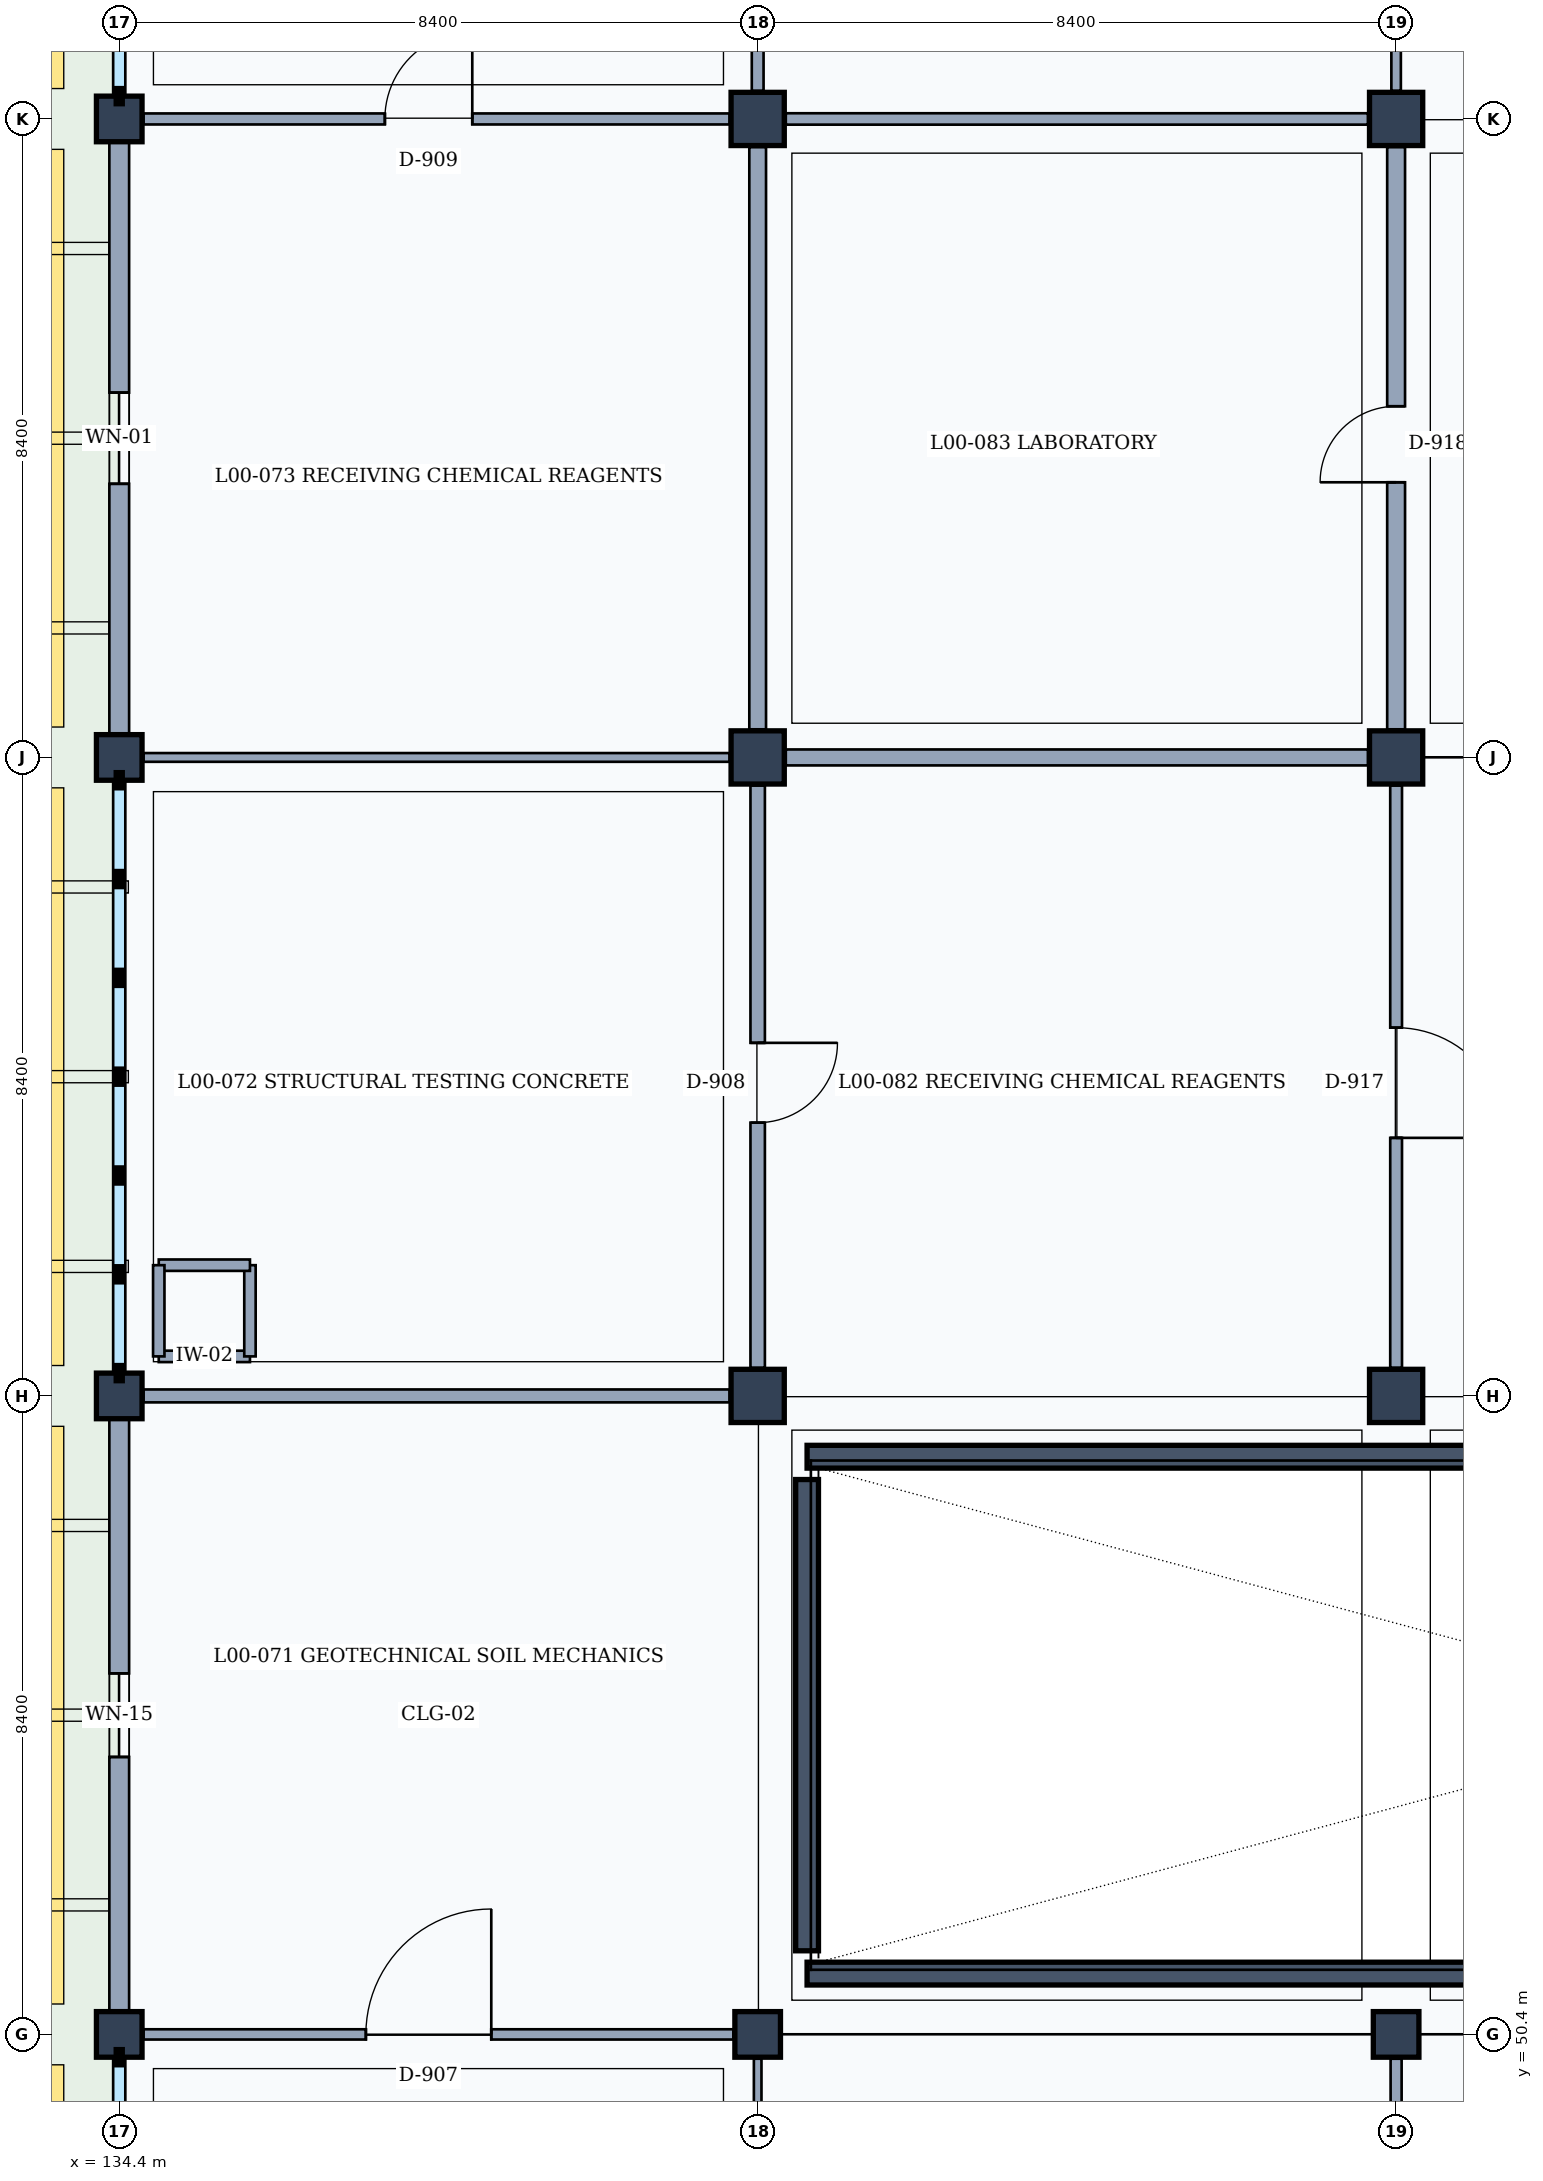
"""IFC4 building model, lengths in metres.
Left out: names, types, materials, properties, quantities, classifications, styles, units other than length and angle.
Written with IfcOpenShell. Run it as: python <this file> out.ifc"""

import sys

from ifc_helpers import new_model, si_unit, direction, frame, frame_2d, origin, origin_2d, place, context, subcontext, project, spatial, rectangle, extrude, element, fill, save


model = new_model("IFC4")
c1 = context("Model", 3, precision=1e-05, world=origin(), true_north=direction((0.0, 1.0)))
c2 = subcontext(c1, "Body", "Model", "MODEL_VIEW")
j1 = project(units=[si_unit("LENGTHUNIT", "METRE"), si_unit("PLANEANGLEUNIT", "RADIAN")], contexts=[c1])
p1 = place(None, origin())
s1 = spatial("IfcSite", under=j1, at=p1, CompositionType="ELEMENT")
p2 = place(p1, origin())
s2 = spatial("IfcBuilding", under=s1, at=p2, CompositionType="ELEMENT")
p3 = place(p2, origin())
s3 = spatial("IfcBuildingStorey", under=s2, at=p3, CompositionType="ELEMENT", Elevation=0.0)
for number, where, z_axis, x_axis in (
    (1, (134.4, 50.4, 0.0), (0.0, 0.0, 1.0), (1.0, 0.0, 0.0)),
    (2, (134.4, 58.8, 0.0), (0.0, 0.0, 1.0), (1.0, 0.0, 0.0)),
    (3, (134.4, 67.2, 0.0), (0.0, 0.0, 1.0), (1.0, 0.0, 0.0)),
    (4, (134.4, 75.6, 0.0), (0.0, 0.0, 1.0), (1.0, 0.0, 0.0)),
    (5, (142.8, 50.4, 0.0), (0.0, 0.0, 1.0), (1.0, 0.0, 0.0)),
):
    element("IfcColumn", number, at=place(p3, frame(where, z_axis=z_axis, x_axis=x_axis)), inside=s3, PredefinedType="COLUMN", context=c2, shape_type="SweptSolid", body=[
        extrude(rectangle(XDim=0.6, YDim=0.6, at=origin_2d()), origin(), (0.0, 0.0, 1.0), 4.8),
    ])
for number, where, z_axis, x_axis in (
    (6, (142.8, 58.8, 0.0), (0.0, 0.0, 1.0), (1.0, 0.0, 0.0)),
    (7, (142.8, 67.2, 0.0), (0.0, 0.0, 1.0), (1.0, 0.0, 0.0)),
    (8, (142.8, 75.6, 0.0), (0.0, 0.0, 1.0), (1.0, 0.0, 0.0)),
):
    element("IfcColumn", number, at=place(p3, frame(where, z_axis=z_axis, x_axis=x_axis)), inside=s3, PredefinedType="COLUMN", context=c2, shape_type="SweptSolid", body=[
        extrude(rectangle(XDim=0.7, YDim=0.7, at=origin_2d()), origin(), (0.0, 0.0, 1.0), 4.8),
    ])
p4 = place(p3, frame((151.2, 50.4, 0.0), z_axis=(0.0, 0.0, 1.0), x_axis=(1.0, 0.0, 0.0)))
e9 = element("IfcColumn", 9, at=p4, inside=s3, PredefinedType="COLUMN", context=c2, shape_type="SweptSolid", body=[
    extrude(rectangle(XDim=0.6, YDim=0.6, at=origin_2d()), origin(), (0.0, 0.0, 1.0), 4.8),
])
for number, where, z_axis, x_axis in (
    (10, (151.2, 58.8, 0.0), (0.0, 0.0, 1.0), (1.0, 0.0, 0.0)),
    (11, (151.2, 67.2, 0.0), (0.0, 0.0, 1.0), (1.0, 0.0, 0.0)),
    (12, (151.2, 75.6, 0.0), (0.0, 0.0, 1.0), (1.0, 0.0, 0.0)),
):
    element("IfcColumn", number, at=place(p3, frame(where, z_axis=z_axis, x_axis=x_axis)), inside=s3, PredefinedType="COLUMN", context=c2, shape_type="SweptSolid", body=[
        extrude(rectangle(XDim=0.7, YDim=0.7, at=origin_2d()), origin(), (0.0, 0.0, 1.0), 4.8),
    ])
p5 = place(p3, frame((134.4, 50.7, 0.0), z_axis=(0.0, 0.0, 1.0), x_axis=(0.0, 1.0, 0.0)))
e13 = element("IfcWall", 13, at=p5, inside=s3, PredefinedType="SOLIDWALL", context=c2, shape_type="SweptSolid", body=[
    extrude(rectangle(XDim=7.8, YDim=0.26, at=frame_2d((3.9, 0.0))), origin(), (0.0, 0.0, 1.0), 3.96),
])
p6 = place(p5, frame((3.35, 0.0, 0.95)))
e14 = element("IfcOpeningElement", 14, at=p6, cuts=e13, PredefinedType="OPENING", context=c2, shape_type="SweptSolid", body=[
    extrude(rectangle(XDim=1.1, YDim=1.95, at=frame_2d((0.55, 0.975))), frame((0.0, 0.14, 0.0), z_axis=(0.0, -1.0, 0.0), x_axis=(1.0, 0.0, 0.0)), (0.0, 0.0, 1.0), 0.28),
])
p7 = place(p3, frame((134.4, 67.5, 0.0), z_axis=(0.0, 0.0, 1.0), x_axis=(0.0, 1.0, 0.0)))
e15 = element("IfcWall", 15, at=p7, inside=s3, PredefinedType="SOLIDWALL", context=c2, shape_type="SweptSolid", body=[
    extrude(rectangle(XDim=7.8, YDim=0.26, at=frame_2d((3.9, 0.0))), origin(), (0.0, 0.0, 1.0), 3.96),
])
p8 = place(p7, frame((3.3, 0.0, 0.95)))
e16 = element("IfcOpeningElement", 16, at=p8, cuts=e15, PredefinedType="OPENING", context=c2, shape_type="SweptSolid", body=[
    extrude(rectangle(XDim=1.2, YDim=1.8, at=frame_2d((0.6, 0.9))), frame((0.0, 0.14, 0.0), z_axis=(0.0, -1.0, 0.0), x_axis=(1.0, 0.0, 0.0)), (0.0, 0.0, 1.0), 0.28),
])
for number, where, z_axis, x_axis in (
    (17, (143.45, 51.2, 0.0), (0.0, 0.0, 1.0), (1.0, 0.0, 0.0)),
    (18, (167.85, 58.0, 0.0), (0.0, 0.0, 1.0), (-1.0, 0.0, 0.0)),
):
    element("IfcWall", number, at=place(p3, frame(where, z_axis=z_axis, x_axis=x_axis)), inside=s3, PredefinedType="SHEAR", context=c2, shape_type="SweptSolid", body=[
        extrude(rectangle(XDim=24.4, YDim=0.3, at=frame_2d((12.2, 0.0))), origin(), (0.0, 0.0, 1.0), 3.8),
    ])
p9 = place(p3, frame((143.45, 57.7, 0.0), z_axis=(0.0, 0.0, 1.0), x_axis=(0.0, -1.0, 0.0)))
e19 = element("IfcWall", 19, at=p9, inside=s3, PredefinedType="SHEAR", context=c2, shape_type="SweptSolid", body=[
    extrude(rectangle(XDim=6.2, YDim=0.3, at=frame_2d((3.1, 0.0))), origin(), (0.0, 0.0, 1.0), 3.8),
])
p10 = place(p3, frame((134.92, 59.32, 0.0), z_axis=(0.0, 0.0, 1.0), x_axis=(1.0, 0.0, 0.0)))
e20 = element("IfcWall", 20, at=p10, inside=s3, PredefinedType="PARTITIONING", context=c2, shape_type="SweptSolid", body=[
    extrude(rectangle(XDim=1.2, YDim=0.15, at=frame_2d((0.6, 0.0))), origin(), (0.0, 0.0, 1.0), 4.55),
])
p11 = place(p3, frame((136.12, 59.32, 0.0), z_axis=(0.0, 0.0, 1.0), x_axis=(0.0, 1.0, 0.0)))
e21 = element("IfcWall", 21, at=p11, inside=s3, PredefinedType="PARTITIONING", context=c2, shape_type="SweptSolid", body=[
    extrude(rectangle(XDim=1.2, YDim=0.15, at=frame_2d((0.6, 0.0))), origin(), (0.0, 0.0, 1.0), 4.55),
])
p12 = place(p3, frame((136.12, 60.52, 0.0), z_axis=(0.0, 0.0, 1.0), x_axis=(-1.0, 0.0, 0.0)))
e22 = element("IfcWall", 22, at=p12, inside=s3, PredefinedType="PARTITIONING", context=c2, shape_type="SweptSolid", body=[
    extrude(rectangle(XDim=1.2, YDim=0.15, at=frame_2d((0.6, 0.0))), origin(), (0.0, 0.0, 1.0), 4.55),
])
p13 = place(p3, frame((134.92, 60.52, 0.0), z_axis=(0.0, 0.0, 1.0), x_axis=(0.0, -1.0, 0.0)))
e23 = element("IfcWall", 23, at=p13, inside=s3, PredefinedType="PARTITIONING", context=c2, shape_type="SweptSolid", body=[
    extrude(rectangle(XDim=1.2, YDim=0.15, at=frame_2d((0.6, 0.0))), origin(), (0.0, 0.0, 1.0), 4.55),
])
p14 = place(p3, frame((142.8, 42.32, 0.0), z_axis=(0.0, 0.0, 1.0), x_axis=(0.0, 1.0, 0.0)))
e24 = element("IfcWall", 24, at=p14, inside=s3, PredefinedType="MOVABLE", context=c2, shape_type="SweptSolid", body=[
    extrude(rectangle(XDim=7.76, YDim=0.1, at=frame_2d((3.88, 0.0))), origin(), (0.0, 0.0, 1.0), 3.92),
])
p15 = place(p3, frame((134.72, 50.4, 0.0), z_axis=(0.0, 0.0, 1.0), x_axis=(1.0, 0.0, 0.0)))
e25 = element("IfcWall", 25, at=p15, inside=s3, PredefinedType="PARTITIONING", context=c2, shape_type="SweptSolid", body=[
    extrude(rectangle(XDim=7.76, YDim=0.135, at=frame_2d((3.88, 0.0))), origin(), (0.0, 0.0, 1.0), 3.85),
])
p16 = place(p15, frame((2.925, 0.0, 0.0)))
e26 = element("IfcOpeningElement", 26, at=p16, cuts=e25, PredefinedType="OPENING", context=c2, shape_type="SweptSolid", body=[
    extrude(rectangle(XDim=1.65, YDim=2.25, at=frame_2d((0.825, 1.125))), frame((0.0, 0.077, 0.0), z_axis=(0.0, -1.0, 0.0), x_axis=(1.0, 0.0, 0.0)), (0.0, 0.0, 1.0), 0.155),
])
p17 = place(p3, frame((134.72, 58.8, 0.0), z_axis=(0.0, 0.0, 1.0), x_axis=(1.0, 0.0, 0.0)))
e27 = element("IfcWall", 27, at=p17, inside=s3, PredefinedType="PARTITIONING", context=c2, shape_type="SweptSolid", body=[
    extrude(rectangle(XDim=7.71, YDim=0.17, at=frame_2d((3.855, 0.0))), origin(), (0.0, 0.0, 1.0), 3.85),
])
p18 = place(p3, frame((142.8, 59.17, 0.0), z_axis=(0.0, 0.0, 1.0), x_axis=(0.0, 1.0, 0.0)))
e28 = element("IfcWall", 28, at=p18, inside=s3, PredefinedType="PARTITIONING", context=c2, shape_type="SweptSolid", body=[
    extrude(rectangle(XDim=7.66, YDim=0.19, at=frame_2d((3.83, 0.0))), origin(), (0.0, 0.0, 1.0), 3.92),
])
p19 = place(p18, frame((3.225, 0.0, 0.0)))
e29 = element("IfcOpeningElement", 29, at=p19, cuts=e28, PredefinedType="OPENING", context=c2, shape_type="SweptSolid", body=[
    extrude(rectangle(XDim=1.05, YDim=2.2, at=frame_2d((0.525, 1.1))), frame((0.0, 0.105, 0.0), z_axis=(0.0, -1.0, 0.0), x_axis=(1.0, 0.0, 0.0)), (0.0, 0.0, 1.0), 0.21),
])
p20 = place(p3, frame((134.72, 67.2, 0.0), z_axis=(0.0, 0.0, 1.0), x_axis=(1.0, 0.0, 0.0)))
e30 = element("IfcWall", 30, at=p20, inside=s3, PredefinedType="PARTITIONING", context=c2, shape_type="SweptSolid", body=[
    extrude(rectangle(XDim=7.71, YDim=0.115, at=frame_2d((3.855, 0.0))), origin(), (0.0, 0.0, 1.0), 3.87),
])
p21 = place(p3, frame((142.8, 67.57, 0.0), z_axis=(0.0, 0.0, 1.0), x_axis=(0.0, 1.0, 0.0)))
e31 = element("IfcWall", 31, at=p21, inside=s3, PredefinedType="PARTITIONING", context=c2, shape_type="SweptSolid", body=[
    extrude(rectangle(XDim=7.66, YDim=0.22, at=frame_2d((3.83, 0.0))), origin(), (0.0, 0.0, 1.0), 3.92),
])
p22 = place(p3, frame((134.72, 75.6, 0.0), z_axis=(0.0, 0.0, 1.0), x_axis=(1.0, 0.0, 0.0)))
e32 = element("IfcWall", 32, at=p22, inside=s3, PredefinedType="PARTITIONING", context=c2, shape_type="SweptSolid", body=[
    extrude(rectangle(XDim=7.71, YDim=0.145, at=frame_2d((3.855, 0.0))), origin(), (0.0, 0.0, 1.0), 3.87),
])
p23 = place(p22, frame((3.175, 0.0, 0.0)))
e33 = element("IfcOpeningElement", 33, at=p23, cuts=e32, PredefinedType="OPENING", context=c2, shape_type="SweptSolid", body=[
    extrude(rectangle(XDim=1.15, YDim=2.25, at=frame_2d((0.575, 1.125))), frame((0.0, 0.083, 0.0), z_axis=(0.0, -1.0, 0.0), x_axis=(1.0, 0.0, 0.0)), (0.0, 0.0, 1.0), 0.165),
])
p24 = place(p3, frame((142.8, 75.97, 0.0), z_axis=(0.0, 0.0, 1.0), x_axis=(0.0, 1.0, 0.0)))
e34 = element("IfcWall", 34, at=p24, inside=s3, PredefinedType="PARTITIONING", context=c2, shape_type="SweptSolid", body=[
    extrude(rectangle(XDim=7.66, YDim=0.155, at=frame_2d((3.83, 0.0))), origin(), (0.0, 0.0, 1.0), 3.92),
])
p25 = place(p3, frame((151.2, 42.32, 0.0), z_axis=(0.0, 0.0, 1.0), x_axis=(0.0, 1.0, 0.0)))
e35 = element("IfcWall", 35, at=p25, inside=s3, PredefinedType="PARTITIONING", context=c2, shape_type="SweptSolid", body=[
    extrude(rectangle(XDim=7.76, YDim=0.145, at=frame_2d((3.88, 0.0))), origin(), (0.0, 0.0, 1.0), 3.92),
])
p26 = place(p25, frame((3.075, 0.0, 0.0)))
e36 = element("IfcOpeningElement", 36, at=p26, cuts=e35, PredefinedType="OPENING", context=c2, shape_type="SweptSolid", body=[
    extrude(rectangle(XDim=1.35, YDim=2.25, at=frame_2d((0.675, 1.125))), frame((0.0, 0.083, 0.0), z_axis=(0.0, -1.0, 0.0), x_axis=(1.0, 0.0, 0.0)), (0.0, 0.0, 1.0), 0.165),
])
p27 = place(p3, frame((151.2, 59.17, 0.0), z_axis=(0.0, 0.0, 1.0), x_axis=(0.0, 1.0, 0.0)))
e37 = element("IfcWall", 37, at=p27, inside=s3, PredefinedType="PARTITIONING", context=c2, shape_type="SweptSolid", body=[
    extrude(rectangle(XDim=7.66, YDim=0.155, at=frame_2d((3.83, 0.0))), origin(), (0.0, 0.0, 1.0), 3.92),
])
p28 = place(p27, frame((3.025, 0.0, 0.0)))
e38 = element("IfcOpeningElement", 38, at=p28, cuts=e37, PredefinedType="OPENING", context=c2, shape_type="SweptSolid", body=[
    extrude(rectangle(XDim=1.45, YDim=2.35, at=frame_2d((0.725, 1.175))), frame((0.0, 0.087, 0.0), z_axis=(0.0, -1.0, 0.0), x_axis=(1.0, 0.0, 0.0)), (0.0, 0.0, 1.0), 0.175),
])
p29 = place(p3, frame((143.17, 67.2, 0.0), z_axis=(0.0, 0.0, 1.0), x_axis=(1.0, 0.0, 0.0)))
e39 = element("IfcWall", 39, at=p29, inside=s3, PredefinedType="PARTITIONING", context=c2, shape_type="SweptSolid", body=[
    extrude(rectangle(XDim=7.66, YDim=0.21, at=frame_2d((3.83, 0.0))), origin(), (0.0, 0.0, 1.0), 3.87),
])
p30 = place(p3, frame((151.2, 67.57, 0.0), z_axis=(0.0, 0.0, 1.0), x_axis=(0.0, 1.0, 0.0)))
e40 = element("IfcWall", 40, at=p30, inside=s3, PredefinedType="PARTITIONING", context=c2, shape_type="SweptSolid", body=[
    extrude(rectangle(XDim=7.66, YDim=0.235, at=frame_2d((3.83, 0.0))), origin(), (0.0, 0.0, 1.0), 3.92),
])
p31 = place(p30, frame((3.25, 0.0, 0.0)))
e41 = element("IfcOpeningElement", 41, at=p31, cuts=e40, PredefinedType="OPENING", context=c2, shape_type="SweptSolid", body=[
    extrude(rectangle(XDim=1.0, YDim=2.15, at=frame_2d((0.5, 1.075))), frame((0.0, 0.127, 0.0), z_axis=(0.0, -1.0, 0.0), x_axis=(1.0, 0.0, 0.0)), (0.0, 0.0, 1.0), 0.255),
])
p32 = place(p3, frame((143.17, 75.6, 0.0), z_axis=(0.0, 0.0, 1.0), x_axis=(1.0, 0.0, 0.0)))
e42 = element("IfcWall", 42, at=p32, inside=s3, PredefinedType="PARTITIONING", context=c2, shape_type="SweptSolid", body=[
    extrude(rectangle(XDim=7.66, YDim=0.15, at=frame_2d((3.83, 0.0))), origin(), (0.0, 0.0, 1.0), 3.87),
])
p33 = place(p3, frame((151.2, 75.97, 0.0), z_axis=(0.0, 0.0, 1.0), x_axis=(0.0, 1.0, 0.0)))
e43 = element("IfcWall", 43, at=p33, inside=s3, PredefinedType="PARTITIONING", context=c2, shape_type="SweptSolid", body=[
    extrude(rectangle(XDim=7.66, YDim=0.125, at=frame_2d((3.83, 0.0))), origin(), (0.0, 0.0, 1.0), 3.92),
])
p34 = place(p6, origin())
e44 = element("IfcWindow", 44, at=p34, inside=s3, PartitioningType="SINGLE_PANEL", PredefinedType="WINDOW", context=c2, shape_type="SweptSolid", body=[
    extrude(rectangle(XDim=1.1, YDim=1.95, at=frame_2d((0.55, 0.975))), frame((0.0, 0.03, 0.0), z_axis=(0.0, -1.0, 0.0), x_axis=(1.0, 0.0, 0.0)), (0.0, 0.0, 1.0), 0.06),
])
fill(e14, e44)
p35 = place(p8, origin())
e45 = element("IfcWindow", 45, at=p35, inside=s3, PartitioningType="SINGLE_PANEL", PredefinedType="WINDOW", context=c2, shape_type="SweptSolid", body=[
    extrude(rectangle(XDim=1.2, YDim=1.8, at=frame_2d((0.6, 0.9))), frame((0.0, 0.03, 0.0), z_axis=(0.0, -1.0, 0.0), x_axis=(1.0, 0.0, 0.0)), (0.0, 0.0, 1.0), 0.06),
])
fill(e16, e45)
p36 = place(p16, origin())
e46 = element("IfcDoor", 46, at=p36, inside=s3, OperationType="SINGLE_SWING_RIGHT", PredefinedType="DOOR", context=c2, shape_type="SweptSolid", body=[
    extrude(rectangle(XDim=1.65, YDim=2.25, at=frame_2d((0.825, 1.125))), frame((0.0, 0.025, 0.0), z_axis=(0.0, -1.0, 0.0), x_axis=(1.0, 0.0, 0.0)), (0.0, 0.0, 1.0), 0.05),
])
fill(e26, e46)
p37 = place(p19, frame((1.05, 0.0, 0.0), z_axis=(0.0, 0.0, 1.0), x_axis=(-1.0, 0.0, 0.0)))
e47 = element("IfcDoor", 47, at=p37, inside=s3, OperationType="SINGLE_SWING_LEFT", PredefinedType="DOOR", context=c2, shape_type="SweptSolid", body=[
    extrude(rectangle(XDim=1.05, YDim=2.2, at=frame_2d((0.525, 1.1))), frame((0.0, 0.025, 0.0), z_axis=(0.0, -1.0, 0.0), x_axis=(1.0, 0.0, 0.0)), (0.0, 0.0, 1.0), 0.05),
])
fill(e29, e47)
p38 = place(p23, origin())
e48 = element("IfcDoor", 48, at=p38, inside=s3, OperationType="SINGLE_SWING_RIGHT", PredefinedType="DOOR", context=c2, shape_type="SweptSolid", body=[
    extrude(rectangle(XDim=1.15, YDim=2.25, at=frame_2d((0.575, 1.125))), frame((0.0, 0.025, 0.0), z_axis=(0.0, -1.0, 0.0), x_axis=(1.0, 0.0, 0.0)), (0.0, 0.0, 1.0), 0.05),
])
fill(e33, e48)
p39 = place(p28, frame((1.45, 0.0, 0.0), z_axis=(0.0, 0.0, 1.0), x_axis=(-1.0, 0.0, 0.0)))
e49 = element("IfcDoor", 49, at=p39, inside=s3, OperationType="SINGLE_SWING_RIGHT", PredefinedType="DOOR", context=c2, shape_type="SweptSolid", body=[
    extrude(rectangle(XDim=1.45, YDim=2.35, at=frame_2d((0.725, 1.175))), frame((0.0, 0.025, 0.0), z_axis=(0.0, -1.0, 0.0), x_axis=(1.0, 0.0, 0.0)), (0.0, 0.0, 1.0), 0.05),
])
fill(e38, e49)
p40 = place(p31, origin())
e50 = element("IfcDoor", 50, at=p40, inside=s3, OperationType="SINGLE_SWING_LEFT", PredefinedType="DOOR", context=c2, shape_type="SweptSolid", body=[
    extrude(rectangle(XDim=1.0, YDim=2.15, at=frame_2d((0.5, 1.075))), frame((0.0, 0.025, 0.0), z_axis=(0.0, -1.0, 0.0), x_axis=(1.0, 0.0, 0.0)), (0.0, 0.0, 1.0), 0.05),
])
fill(e41, e50)
save(model, sys.argv[1])
